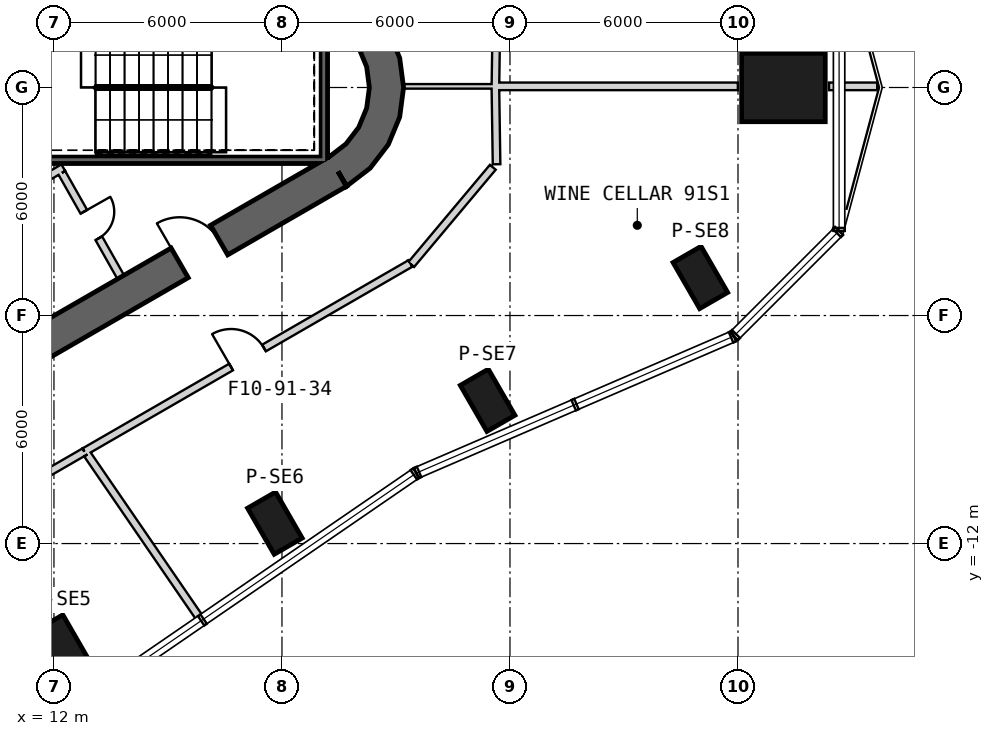
"""IFC4 building model, lengths in metres.
Left out: names, types, materials, properties, quantities, classifications, styles, units other than length and angle.
Written with IfcOpenShell. Run it as: python <this file> out.ifc"""

import sys

from ifc_helpers import new_model, si_unit, direction, frame, frame_2d, origin, origin_2d, place, context, subcontext, project, spatial, polyline, rectangle, outline, extrude, element, fill, save


model = new_model("IFC4")
c1 = context("Model", 3, precision=1e-05, world=origin(), true_north=direction((0.0, 1.0)))
c2 = subcontext(c1, "Body", "Model", "MODEL_VIEW")
j1 = project(units=[si_unit("LENGTHUNIT", "METRE"), si_unit("PLANEANGLEUNIT", "RADIAN")], contexts=[c1])
p1 = place(None, origin())
s1 = spatial("IfcSite", under=j1, at=p1, CompositionType="ELEMENT")
p2 = place(p1, origin())
s2 = spatial("IfcBuilding", under=s1, at=p2, CompositionType="ELEMENT")
p3 = place(p2, frame((0.0, 0.0, 398.3)))
s3 = spatial("IfcBuildingStorey", under=s2, at=p3, CompositionType="ELEMENT", Elevation=398.3)
p4 = place(p3, frame((31.196, 0.0, 0.0), z_axis=(0.0, 0.0, 1.0), x_axis=(1.0, 0.0, 0.0)))
e1 = element("IfcColumn", 1, at=p4, inside=s3, PredefinedType="COLUMN", context=c2, shape_type="SweptSolid", body=[
    extrude(rectangle(XDim=2.2, YDim=1.8, at=origin_2d()), origin(), (0.0, 0.0, 1.0), 6.5),
])
for number, where, z_axis, x_axis in (
    (2, (12.216, -14.695, -0.3), (0.0, 0.0, 1.0), (0.5, -0.866, 0.0)),
    (3, (17.814, -11.463, -0.3), (0.0, 0.0, 1.0), (0.5, -0.866, 0.0)),
):
    element("IfcColumn", number, at=place(p3, frame(where, z_axis=z_axis, x_axis=x_axis)), inside=s3, PredefinedType="COLUMN", context=c2, shape_type="SweptSolid", body=[
        extrude(rectangle(XDim=1.4, YDim=0.85, at=origin_2d()), origin(), (0.0, 0.0, 1.0), 6.8),
    ])
for number, where, z_axis, x_axis in (
    (4, (23.412, -8.231, 0.0), (0.0, 0.0, 1.0), (0.5, -0.866, 0.0)),
    (5, (29.01, -4.999, 0.0), (0.0, 0.0, 1.0), (0.5, -0.866, 0.0)),
):
    element("IfcColumn", number, at=place(p3, frame(where, z_axis=z_axis, x_axis=x_axis)), inside=s3, PredefinedType="COLUMN", context=c2, shape_type="SweptSolid", body=[
        extrude(rectangle(XDim=1.4, YDim=0.85, at=origin_2d()), origin(), (0.0, 0.0, 1.0), 6.5),
    ])
p5 = place(p3, frame((-7.825, -17.97, 0.0), z_axis=(0.0, 0.0, 1.0), x_axis=(0.866028369851, 0.499994862586, 0.0)))
e6 = element("IfcWall", 6, at=p5, inside=s3, PredefinedType="SHEAR", context=c2, shape_type="SweptSolid", body=[
    extrude(rectangle(XDim=31.523, YDim=0.9, at=frame_2d((15.762, 0.0))), origin(), (0.0, 0.0, 1.0), 6.5),
])
p6 = place(p5, frame((7.062, 0.0, 0.0)))
e7 = element("IfcOpeningElement", 7, at=p6, cuts=e6, PredefinedType="OPENING", context=c2, shape_type="SweptSolid", body=[
    extrude(rectangle(XDim=1.2, YDim=2.4, at=frame_2d((0.6, 1.2))), frame((0.0, 0.46, 0.0), z_axis=(0.0, -1.0, 0.0), x_axis=(1.0, 0.0, 0.0)), (0.0, 0.0, 1.0), 0.92),
])
p7 = place(p5, frame((9.762, 0.0, 0.0)))
e8 = element("IfcOpeningElement", 8, at=p7, cuts=e6, PredefinedType="OPENING", context=c2, shape_type="SweptSolid", body=[
    extrude(rectangle(XDim=1.2, YDim=2.4, at=frame_2d((0.6, 1.2))), frame((0.0, 0.46, 0.0), z_axis=(0.0, -1.0, 0.0), x_axis=(1.0, 0.0, 0.0)), (0.0, 0.0, 1.0), 0.92),
])
p8 = place(p5, frame((17.862, 0.0, 0.0)))
e9 = element("IfcOpeningElement", 9, at=p8, cuts=e6, PredefinedType="OPENING", context=c2, shape_type="SweptSolid", body=[
    extrude(rectangle(XDim=1.2, YDim=2.4, at=frame_2d((0.6, 1.2))), frame((0.0, 0.46, 0.0), z_axis=(0.0, -1.0, 0.0), x_axis=(1.0, 0.0, 0.0)), (0.0, 0.0, 1.0), 0.92),
])
p9 = place(p5, frame((20.562, 0.0, 0.0)))
e10 = element("IfcOpeningElement", 10, at=p9, cuts=e6, PredefinedType="OPENING", context=c2, shape_type="SweptSolid", body=[
    extrude(rectangle(XDim=1.2, YDim=2.4, at=frame_2d((0.6, 1.2))), frame((0.0, 0.46, 0.0), z_axis=(0.0, -1.0, 0.0), x_axis=(1.0, 0.0, 0.0)), (0.0, 0.0, 1.0), 0.92),
])
p10 = place(p5, frame((26.712, 0.0, 0.0)))
e11 = element("IfcOpeningElement", 11, at=p10, cuts=e6, PredefinedType="OPENING", context=c2, shape_type="SweptSolid", body=[
    extrude(rectangle(XDim=1.2, YDim=2.4, at=frame_2d((0.6, 1.2))), frame((0.0, 0.46, 0.0), z_axis=(0.0, -1.0, 0.0), x_axis=(1.0, 0.0, 0.0)), (0.0, 0.0, 1.0), 0.92),
])
p11 = place(p5, frame((3.612, 0.0, 0.0)))
e12 = element("IfcOpeningElement", 12, at=p11, cuts=e6, PredefinedType="OPENING", context=c2, shape_type="SweptSolid", body=[
    extrude(rectangle(XDim=1.2, YDim=2.4, at=frame_2d((0.6, 1.2))), frame((0.0, 0.46, 0.0), z_axis=(0.0, -1.0, 0.0), x_axis=(1.0, 0.0, 0.0)), (0.0, 0.0, 1.0), 0.92),
])
p12 = place(p3, origin())
e13 = element("IfcWall", 13, at=p12, inside=s3, PredefinedType="SHEAR", context=c2, shape_type="SweptSolid", body=[
    extrude(outline(polyline([(19.7, -2.598), (20.321, -2.121), (20.798, -1.5), (21.098, -0.777), (21.2, 0.0), (21.098, 0.777), (20.798, 1.5), (20.321, 2.121), (19.7, 2.598), (19.25, 1.819), (19.685, 1.485), (20.019, 1.05), (20.229, 0.543), (20.3, 0.0), (20.229, -0.543), (20.019, -1.05), (19.685, -1.485), (19.25, -1.819), (19.7, -2.598)])), origin(), (0.0, 0.0, 1.0), 6.5),
])
p13 = place(p3, frame((19.1, -2.0, -0.3), z_axis=(0.0, 0.0, 1.0), x_axis=(0.0, 1.0, 0.0)))
e14 = element("IfcWall", 14, at=p13, inside=s3, PredefinedType="SHEAR", context=c2, shape_type="SweptSolid", body=[
    extrude(rectangle(XDim=3.8, YDim=0.2, at=frame_2d((1.9, 0.0))), origin(), (0.0, 0.0, 1.0), 6.5),
])
p14 = place(p3, frame((11.1, -1.9, -0.3), z_axis=(0.0, 0.0, 1.0), x_axis=(1.0, 0.0, 0.0)))
e15 = element("IfcWall", 15, at=p14, inside=s3, PredefinedType="SHEAR", context=c2, shape_type="SweptSolid", body=[
    extrude(rectangle(XDim=7.9, YDim=0.2, at=frame_2d((3.95, 0.0))), origin(), (0.0, 0.0, 1.0), 6.5),
])
p15 = place(p3, frame((12.245, -2.109, 0.0), z_axis=(0.0, 0.0, 1.0), x_axis=(-0.860414880418, -0.509594185166, 0.0)))
e16 = element("IfcWall", 16, at=p15, inside=s3, PredefinedType="PARTITIONING", context=c2, shape_type="SweptSolid", body=[
    extrude(rectangle(XDim=2.7, YDim=0.2, at=frame_2d((1.35, 0.0))), origin(), (0.0, 0.0, 1.0), 6.2),
])
p16 = place(p3, frame((13.758, -4.99, 0.0), z_axis=(0.0, 0.0, 1.0), x_axis=(-0.491993409184, 0.87059892334, 0.0)))
e17 = element("IfcWall", 17, at=p16, inside=s3, PredefinedType="PARTITIONING", context=c2, shape_type="SweptSolid", body=[
    extrude(rectangle(XDim=3.15, YDim=0.2, at=frame_2d((1.575, 0.0))), origin(), (0.0, 0.0, 1.0), 6.2),
])
p17 = place(p16, frame((1.175, 0.0, 0.0)))
e18 = element("IfcOpeningElement", 18, at=p17, cuts=e17, PredefinedType="OPENING", context=c2, shape_type="SweptSolid", body=[
    extrude(rectangle(XDim=0.8, YDim=2.1, at=frame_2d((0.4, 1.05))), frame((0.0, 0.11, 0.0), z_axis=(0.0, -1.0, 0.0), x_axis=(1.0, 0.0, 0.0)), (0.0, 0.0, 1.0), 0.22),
])
p18 = place(p3, frame((23.616, 0.0, 0.0), z_axis=(0.0, 0.0, 1.0), x_axis=(0.015079027421, 0.999886305003, 0.0)))
e19 = element("IfcWall", 19, at=p18, inside=s3, PredefinedType="PARTITIONING", context=c2, shape_type="SweptSolid", body=[
    extrude(rectangle(XDim=1.83, YDim=0.2, at=frame_2d((0.915, 0.0))), origin(), (0.0, 0.0, 1.0), 5.57),
])
p19 = place(p3, frame((23.646, 0.03, 0.0), z_axis=(0.0, 0.0, 1.0), x_axis=(-1.0, 0.0, 0.0)))
e20 = element("IfcWall", 20, at=p19, inside=s3, PredefinedType="PARTITIONING", context=c2, shape_type="SweptSolid", body=[
    extrude(rectangle(XDim=2.6, YDim=0.12, at=frame_2d((1.3, 0.0))), origin(), (0.0, 0.0, 1.0), 5.57),
])
p20 = place(p3, frame((23.646, 0.03, 0.0), z_axis=(0.0, 0.0, 1.0), x_axis=(1.0, 0.0, 0.0)))
e21 = element("IfcWall", 21, at=p20, inside=s3, PredefinedType="PARTITIONING", context=c2, shape_type="SweptSolid", body=[
    extrude(rectangle(XDim=6.349, YDim=0.2, at=frame_2d((3.175, 0.0))), origin(), (0.0, 0.0, 1.0), 5.57),
])
p21 = place(p3, frame((32.396, 0.03, 0.0), z_axis=(0.0, 0.0, 1.0), x_axis=(1.0, 0.0, 0.0)))
e22 = element("IfcWall", 22, at=p21, inside=s3, PredefinedType="PARTITIONING", context=c2, shape_type="SweptSolid", body=[
    extrude(rectangle(XDim=1.268, YDim=0.2, at=frame_2d((0.634, 0.0))), origin(), (0.0, 0.0, 1.0), 6.2),
])
p22 = place(p3, frame((1.009, -16.391, 0.0), z_axis=(0.0, 0.0, 1.0), x_axis=(0.866026744585, 0.499997677658, 0.0)))
e23 = element("IfcWall", 23, at=p22, inside=s3, PredefinedType="PARTITIONING", context=c2, shape_type="SweptSolid", body=[
    extrude(rectangle(XDim=13.617, YDim=0.2, at=frame_2d((6.808, 0.0))), origin(), (0.0, 0.0, 1.0), 5.67),
])
p23 = place(p22, frame((6.456, 0.0, 0.0)))
e24 = element("IfcOpeningElement", 24, at=p23, cuts=e23, PredefinedType="OPENING", context=c2, shape_type="SweptSolid", body=[
    extrude(rectangle(XDim=1.0, YDim=2.1, at=frame_2d((0.5, 1.05))), frame((0.0, 0.11, 0.0), z_axis=(0.0, -1.0, 0.0), x_axis=(1.0, 0.0, 0.0)), (0.0, 0.0, 1.0), 0.22),
])
p24 = place(p3, frame((12.802, -9.583, 0.0), z_axis=(0.0, 0.0, 1.0), x_axis=(0.866025905529, 0.499999130952, 0.0)))
e25 = element("IfcWall", 25, at=p24, inside=s3, PredefinedType="PARTITIONING", context=c2, shape_type="SweptSolid", body=[
    extrude(rectangle(XDim=9.904, YDim=0.2, at=frame_2d((4.952, 0.0))), origin(), (0.0, 0.0, 1.0), 5.57),
])
p25 = place(p24, frame((4.456, 0.0, 0.0)))
e26 = element("IfcOpeningElement", 26, at=p25, cuts=e25, PredefinedType="OPENING", context=c2, shape_type="SweptSolid", body=[
    extrude(rectangle(XDim=1.0, YDim=2.1, at=frame_2d((0.5, 1.05))), frame((0.0, 0.11, 0.0), z_axis=(0.0, -1.0, 0.0), x_axis=(1.0, 0.0, 0.0)), (0.0, 0.0, 1.0), 0.22),
])
p26 = place(p3, frame((23.647, -2.02, 0.0), z_axis=(0.0, 0.0, 1.0), x_axis=(-0.015109493549, 0.999885845087, 0.0)))
e27 = element("IfcWall", 27, at=p26, inside=s3, PredefinedType="PARTITIONING", context=c2, shape_type="SweptSolid", body=[
    extrude(rectangle(XDim=2.02, YDim=0.2, at=frame_2d((1.01, 0.0))), origin(), (0.0, 0.0, 1.0), 5.57),
])
p27 = place(p3, frame((21.401, -4.657, 0.0), z_axis=(0.0, 0.0, 1.0), x_axis=(0.642826822895, 0.76601153762, 0.0)))
e28 = element("IfcWall", 28, at=p27, inside=s3, PredefinedType="PARTITIONING", context=c2, shape_type="SweptSolid", body=[
    extrude(rectangle(XDim=3.34, YDim=0.2, at=frame_2d((1.67, 0.0))), origin(), (0.0, 0.0, 1.0), 5.57),
])
p28 = place(p3, frame((12.879, -9.654, 0.0), z_axis=(0.0, 0.0, 1.0), x_axis=(0.565899563161, -0.824474186627, 0.0)))
e29 = element("IfcWall", 29, at=p28, inside=s3, PredefinedType="PARTITIONING", context=c2, shape_type="SweptSolid", body=[
    extrude(rectangle(XDim=5.303, YDim=0.2, at=frame_2d((2.652, 0.0))), origin(), (0.0, 0.0, 1.0), 6.2),
])
p29 = place(p17, origin())
e30 = element("IfcDoor", 30, at=p29, inside=s3, OperationType="SINGLE_SWING_RIGHT", PredefinedType="USERDEFINED", context=c2, shape_type="SweptSolid", body=[
    extrude(rectangle(XDim=0.8, YDim=2.1, at=frame_2d((0.4, 1.05))), frame((0.0, 0.025, 0.0), z_axis=(0.0, -1.0, 0.0), x_axis=(1.0, 0.0, 0.0)), (0.0, 0.0, 1.0), 0.05),
])
fill(e18, e30)
p30 = place(p25, origin())
e31 = element("IfcDoor", 31, at=p30, inside=s3, OperationType="SINGLE_SWING_LEFT", PredefinedType="USERDEFINED", context=c2, shape_type="SweptSolid", body=[
    extrude(rectangle(XDim=1.0, YDim=2.1, at=frame_2d((0.5, 1.05))), frame((0.0, 0.025, 0.0), z_axis=(0.0, -1.0, 0.0), x_axis=(1.0, 0.0, 0.0)), (0.0, 0.0, 1.0), 0.05),
])
fill(e26, e31)
p31 = place(p10, origin())
e32 = element("IfcDoor", 32, at=p31, inside=s3, OperationType="SINGLE_SWING_LEFT", PredefinedType="USERDEFINED", context=c2, shape_type="SweptSolid", body=[
    extrude(rectangle(XDim=1.2, YDim=2.4, at=frame_2d((0.6, 1.2))), frame((0.0, 0.025, 0.0), z_axis=(0.0, -1.0, 0.0), x_axis=(1.0, 0.0, 0.0)), (0.0, 0.0, 1.0), 0.05),
])
fill(e11, e32)
save(model, sys.argv[1])
